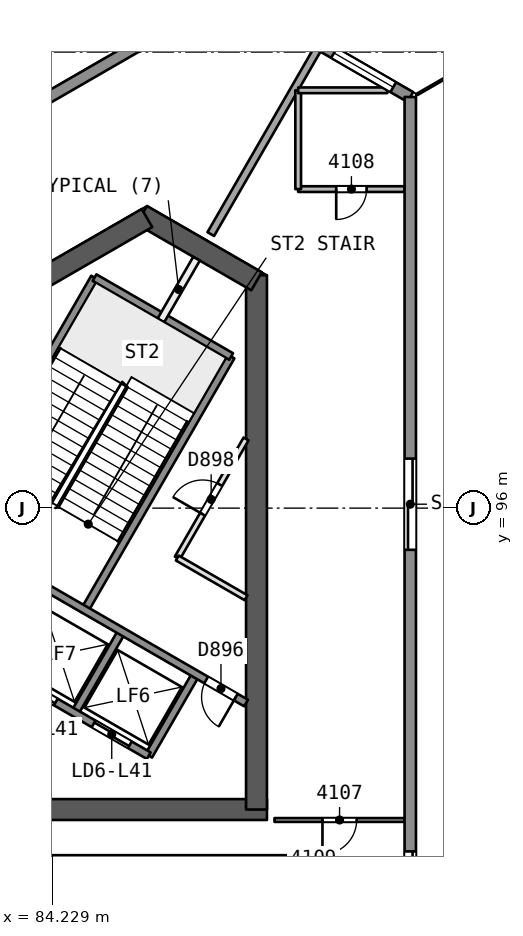
"""IFC4 building model, lengths in metres.
Left out: names, types, materials, properties, quantities, classifications, styles, units other than length and angle.
Written with IfcOpenShell. Run it as: python <this file> out.ifc"""

import sys

from ifc_helpers import new_model, si_unit, direction, frame, frame_2d, origin, place, context, subcontext, project, spatial, rectangle, extrude, element, fill, save


model = new_model("IFC4")
c1 = context("Model", 3, precision=1e-05, world=origin(), true_north=direction((0.0, 1.0)))
c2 = subcontext(c1, "Body", "Model", "MODEL_VIEW")
j1 = project(units=[si_unit("LENGTHUNIT", "METRE"), si_unit("PLANEANGLEUNIT", "RADIAN")], contexts=[c1])
p1 = place(None, origin())
s1 = spatial("IfcSite", under=j1, at=p1, CompositionType="ELEMENT")
p2 = place(p1, origin())
s2 = spatial("IfcBuilding", under=s1, at=p2, CompositionType="ELEMENT")
p3 = place(p2, frame((0.0, 0.0, 171.1)))
s3 = spatial("IfcBuildingStorey", under=s2, at=p3, CompositionType="ELEMENT", Elevation=171.1)
p4 = place(p3, frame((79.659, 88.069, 0.0), z_axis=(0.0, 0.0, 1.0), x_axis=(1.0, 0.0, 0.0)))
e1 = element("IfcWall", 1, at=p4, inside=s3, PredefinedType="SHEAR", context=c2, shape_type="SweptSolid", body=[
    extrude(rectangle(XDim=10.221, YDim=0.55, at=frame_2d((5.111, 0.0))), origin(), (0.0, 0.0, 1.0), 3.7),
])
p5 = place(p4, frame((0.791, 0.0, 0.0)))
e2 = element("IfcOpeningElement", 2, at=p5, cuts=e1, PredefinedType="OPENING", context=c2, shape_type="SweptSolid", body=[
    extrude(rectangle(XDim=1.2, YDim=2.1, at=frame_2d((0.6, 1.05))), frame((0.0, 0.286, 0.0), z_axis=(0.0, -1.0, 0.0), x_axis=(1.0, 0.0, 0.0)), (0.0, 0.0, 1.0), 0.571),
])
p6 = place(p3, frame((89.605, 88.069, 0.0), z_axis=(0.0, 0.0, 1.0), x_axis=(0.0, 1.0, 0.0)))
e3 = element("IfcWall", 3, at=p6, inside=s3, PredefinedType="SHEAR", context=c2, shape_type="SweptSolid", body=[
    extrude(rectangle(XDim=14.058, YDim=0.55, at=frame_2d((7.029, 0.0))), origin(), (0.0, 0.0, 1.0), 3.7),
])
p7 = place(p3, frame((89.605, 101.969, 0.0), z_axis=(0.0, 0.0, 1.0), x_axis=(-0.865997833373, 0.500047750313, 0.0)))
e4 = element("IfcWall", 4, at=p7, inside=s3, PredefinedType="SHEAR", context=c2, shape_type="SweptSolid", body=[
    extrude(rectangle(XDim=3.487, YDim=0.55, at=frame_2d((1.743, 0.0))), origin(), (0.0, 0.0, 1.0), 3.7),
])
p8 = place(p3, frame((86.723, 103.633, 0.0), z_axis=(0.0, 0.0, 1.0), x_axis=(-0.866023530946, -0.500003243837, 0.0)))
e5 = element("IfcWall", 5, at=p8, inside=s3, PredefinedType="SHEAR", context=c2, shape_type="SweptSolid", body=[
    extrude(rectangle(XDim=14.175, YDim=0.55, at=frame_2d((7.087, 0.0))), origin(), (0.0, 0.0, 1.0), 3.7),
])
p9 = place(p3, frame((93.502, 87.794, 0.0), z_axis=(0.0, 0.0, 1.0), x_axis=(-1.0, 0.0, 0.0)))
e6 = element("IfcWall", 6, at=p9, inside=s3, PredefinedType="PARTITIONING", context=c2, shape_type="SweptSolid", body=[
    extrude(rectangle(XDim=3.423, YDim=0.1, at=frame_2d((1.712, 0.0))), origin(), (0.0, 0.0, 1.0), 3.25),
])
p10 = place(p9, frame((1.262, 0.0, 0.0)))
e7 = element("IfcOpeningElement", 7, at=p10, cuts=e6, PredefinedType="OPENING", context=c2, shape_type="SweptSolid", body=[
    extrude(rectangle(XDim=0.9, YDim=2.1, at=frame_2d((0.45, 1.05))), frame((0.0, 0.061, 0.0), z_axis=(0.0, -1.0, 0.0), x_axis=(1.0, 0.0, 0.0)), (0.0, 0.0, 1.0), 0.121),
])
p11 = place(p3, frame((82.1, 86.768, 0.0), z_axis=(0.0, 0.0, 1.0), x_axis=(1.0, 0.0, 0.0)))
e8 = element("IfcWall", 8, at=p11, inside=s3, PredefinedType="PARTITIONING", context=c2, shape_type="SweptSolid", body=[
    extrude(rectangle(XDim=9.0, YDim=0.2, at=frame_2d((4.5, 0.0))), origin(), (0.0, 0.0, 1.0), 3.25),
])
p12 = place(p3, frame((93.502, 104.394, 0.0), z_axis=(0.0, 0.0, 1.0), x_axis=(-1.0, 0.0, 0.0)))
e9 = element("IfcWall", 9, at=p12, inside=s3, PredefinedType="PARTITIONING", context=c2, shape_type="SweptSolid", body=[
    extrude(rectangle(XDim=2.801, YDim=0.15, at=frame_2d((1.4, 0.0))), origin(), (0.0, 0.0, 1.0), 3.25),
])
p13 = place(p12, frame((1.0, 0.0, 0.0)))
e10 = element("IfcOpeningElement", 10, at=p13, cuts=e9, PredefinedType="OPENING", context=c2, shape_type="SweptSolid", body=[
    extrude(rectangle(XDim=0.8, YDim=2.1, at=frame_2d((0.4, 1.05))), frame((0.0, 0.085, 0.0), z_axis=(0.0, -1.0, 0.0), x_axis=(1.0, 0.0, 0.0)), (0.0, 0.0, 1.0), 0.171),
])
p14 = place(p3, frame((90.702, 104.394, 0.0), z_axis=(0.0, 0.0, 1.0), x_axis=(0.0, 1.0, 0.0)))
e11 = element("IfcWall", 11, at=p14, inside=s3, PredefinedType="PARTITIONING", context=c2, shape_type="SweptSolid", body=[
    extrude(rectangle(XDim=2.6, YDim=0.15, at=frame_2d((1.3, 0.0))), origin(), (0.0, 0.0, 1.0), 3.25),
])
p15 = place(p3, frame((90.702, 106.994, 0.0), z_axis=(0.0, 0.0, 1.0), x_axis=(1.0, 0.0, 0.0)))
e12 = element("IfcWall", 12, at=p15, inside=s3, PredefinedType="PARTITIONING", context=c2, shape_type="SweptSolid", body=[
    extrude(rectangle(XDim=2.346, YDim=0.15, at=frame_2d((1.173, 0.0))), origin(), (0.0, 0.0, 1.0), 3.25),
])
p16 = place(p3, frame((91.202, 108.06, 0.0), z_axis=(0.0, 0.0, 1.0), x_axis=(-0.500021875362, -0.86601277367, 0.0)))
e13 = element("IfcWall", 13, at=p16, inside=s3, PredefinedType="PARTITIONING", context=c2, shape_type="SweptSolid", body=[
    extrude(rectangle(XDim=5.599, YDim=0.2, at=frame_2d((2.8, 0.0))), origin(), (0.0, 0.0, 1.0), 3.25),
])
p17 = place(p3, frame((88.899, 109.561, 0.0), z_axis=(0.0, 0.0, 1.0), x_axis=(0.866038895281, -0.499976631314, 0.0)))
e14 = element("IfcWall", 14, at=p17, inside=s3, PredefinedType="SOLIDWALL", context=c2, shape_type="SweptSolid", body=[
    extrude(rectangle(XDim=5.488, YDim=0.3, at=frame_2d((2.744, 0.0))), origin(), (0.0, 0.0, 1.0), 3.25),
])
p18 = place(p17, frame((3.17, 0.0, 0.9)))
e15 = element("IfcOpeningElement", 15, at=p18, cuts=e14, PredefinedType="OPENING", context=c2, shape_type="SweptSolid", body=[
    extrude(rectangle(XDim=1.8, YDim=1.5, at=frame_2d((0.9, 0.75))), frame((0.0, 0.161, 0.0), z_axis=(0.0, -1.0, 0.0), x_axis=(1.0, 0.0, 0.0)), (0.0, 0.0, 1.0), 0.321),
])
p19 = place(p17, frame((0.429, 0.0, 0.9)))
e16 = element("IfcOpeningElement", 16, at=p19, cuts=e14, PredefinedType="OPENING", context=c2, shape_type="SweptSolid", body=[
    extrude(rectangle(XDim=1.8, YDim=1.5, at=frame_2d((0.9, 0.75))), frame((0.0, 0.161, 0.0), z_axis=(0.0, -1.0, 0.0), x_axis=(1.0, 0.0, 0.0)), (0.0, 0.0, 1.0), 0.321),
])
p20 = place(p3, frame((93.651, 106.818, 0.0), z_axis=(0.0, 0.0, 1.0), x_axis=(0.0, -1.0, 0.0)))
e17 = element("IfcWall", 17, at=p20, inside=s3, PredefinedType="SOLIDWALL", context=c2, shape_type="SweptSolid", body=[
    extrude(rectangle(XDim=53.635, YDim=0.3, at=frame_2d((26.818, 0.0))), origin(), (0.0, 0.0, 1.0), 3.25),
])
p21 = place(p20, frame((30.294, 0.0, 0.0)))
e18 = element("IfcOpeningElement", 18, at=p21, cuts=e17, PredefinedType="OPENING", context=c2, shape_type="SweptSolid", body=[
    extrude(rectangle(XDim=2.4, YDim=2.4, at=frame_2d((1.2, 1.2))), frame((0.0, 0.161, 0.0), z_axis=(0.0, -1.0, 0.0), x_axis=(1.0, 0.0, 0.0)), (0.0, 0.0, 1.0), 0.321),
])
p22 = place(p20, frame((41.683, 0.0, 0.0)))
e19 = element("IfcOpeningElement", 19, at=p22, cuts=e17, PredefinedType="OPENING", context=c2, shape_type="SweptSolid", body=[
    extrude(rectangle(XDim=2.4, YDim=2.4, at=frame_2d((1.2, 1.2))), frame((0.0, 0.161, 0.0), z_axis=(0.0, -1.0, 0.0), x_axis=(1.0, 0.0, 0.0)), (0.0, 0.0, 1.0), 0.321),
])
p23 = place(p20, frame((19.85, 0.0, 0.0)))
e20 = element("IfcOpeningElement", 20, at=p23, cuts=e17, PredefinedType="OPENING", context=c2, shape_type="SweptSolid", body=[
    extrude(rectangle(XDim=2.4, YDim=2.4, at=frame_2d((1.2, 1.2))), frame((0.0, 0.161, 0.0), z_axis=(0.0, -1.0, 0.0), x_axis=(1.0, 0.0, 0.0)), (0.0, 0.0, 1.0), 0.321),
])
p24 = place(p20, frame((9.514, 0.0, 0.0)))
e21 = element("IfcOpeningElement", 21, at=p24, cuts=e17, PredefinedType="OPENING", context=c2, shape_type="SweptSolid", body=[
    extrude(rectangle(XDim=2.4, YDim=2.4, at=frame_2d((1.2, 1.2))), frame((0.0, 0.161, 0.0), z_axis=(0.0, -1.0, 0.0), x_axis=(1.0, 0.0, 0.0)), (0.0, 0.0, 1.0), 0.321),
])
p25 = place(p20, frame((24.826, 0.0, 0.9)))
e22 = element("IfcOpeningElement", 22, at=p25, cuts=e17, PredefinedType="OPENING", context=c2, shape_type="SweptSolid", body=[
    extrude(rectangle(XDim=1.8, YDim=1.5, at=frame_2d((0.9, 0.75))), frame((0.0, 0.161, 0.0), z_axis=(0.0, -1.0, 0.0), x_axis=(1.0, 0.0, 0.0)), (0.0, 0.0, 1.0), 0.321),
])
p26 = place(p3, frame((42.45, 82.744, 0.0), z_axis=(0.0, 0.0, 1.0), x_axis=(0.866024128163, 0.500002209434, 0.0)))
e23 = element("IfcWall", 23, at=p26, inside=s3, PredefinedType="SOLIDWALL", context=c2, shape_type="SweptSolid", body=[
    extrude(rectangle(XDim=53.635, YDim=0.3, at=frame_2d((26.817, 0.0))), origin(), (0.0, 0.0, 1.0), 3.25),
])
p27 = place(p26, frame((20.473, 0.0, 0.0)))
e24 = element("IfcOpeningElement", 24, at=p27, cuts=e23, PredefinedType="OPENING", context=c2, shape_type="SweptSolid", body=[
    extrude(rectangle(XDim=2.4, YDim=2.4, at=frame_2d((1.2, 1.2))), frame((0.0, 0.161, 0.0), z_axis=(0.0, -1.0, 0.0), x_axis=(1.0, 0.0, 0.0)), (0.0, 0.0, 1.0), 0.321),
])
p28 = place(p26, frame((9.514, 0.0, 0.0)))
e25 = element("IfcOpeningElement", 25, at=p28, cuts=e23, PredefinedType="OPENING", context=c2, shape_type="SweptSolid", body=[
    extrude(rectangle(XDim=2.4, YDim=2.4, at=frame_2d((1.2, 1.2))), frame((0.0, 0.161, 0.0), z_axis=(0.0, -1.0, 0.0), x_axis=(1.0, 0.0, 0.0)), (0.0, 0.0, 1.0), 0.321),
])
p29 = place(p26, frame((40.628, 0.0, 0.0)))
e26 = element("IfcOpeningElement", 26, at=p29, cuts=e23, PredefinedType="OPENING", context=c2, shape_type="SweptSolid", body=[
    extrude(rectangle(XDim=2.4, YDim=2.4, at=frame_2d((1.2, 1.2))), frame((0.0, 0.161, 0.0), z_axis=(0.0, -1.0, 0.0), x_axis=(1.0, 0.0, 0.0)), (0.0, 0.0, 1.0), 0.321),
])
p30 = place(p26, frame((27.632, 0.0, 0.9)))
e27 = element("IfcOpeningElement", 27, at=p30, cuts=e23, PredefinedType="OPENING", context=c2, shape_type="SweptSolid", body=[
    extrude(rectangle(XDim=1.8, YDim=1.5, at=frame_2d((0.9, 0.75))), frame((0.0, 0.161, 0.0), z_axis=(0.0, -1.0, 0.0), x_axis=(1.0, 0.0, 0.0)), (0.0, 0.0, 1.0), 0.321),
])
p31 = place(p26, frame((24.826, 0.0, 0.9)))
e28 = element("IfcOpeningElement", 28, at=p31, cuts=e23, PredefinedType="OPENING", context=c2, shape_type="SweptSolid", body=[
    extrude(rectangle(XDim=1.8, YDim=1.5, at=frame_2d((0.9, 0.75))), frame((0.0, 0.161, 0.0), z_axis=(0.0, -1.0, 0.0), x_axis=(1.0, 0.0, 0.0)), (0.0, 0.0, 1.0), 0.321),
])
p32 = place(p3, frame((86.77, 89.486, 0.0), z_axis=(0.0, 0.0, 1.0), x_axis=(0.499961042966, 0.86604789447, 0.0)))
e29 = element("IfcWall", 29, at=p32, inside=s3, PredefinedType="SOLIDWALL", context=c2, shape_type="SweptSolid", body=[
    extrude(rectangle(XDim=2.48, YDim=0.2, at=frame_2d((1.24, 0.0))), origin(), (0.0, 0.0, 1.0), 3.25),
])
p33 = place(p3, frame((87.521, 94.687, 0.0), z_axis=(0.0, 0.0, 1.0), x_axis=(0.500043727655, 0.866000156139, 0.0)))
e30 = element("IfcWall", 30, at=p33, inside=s3, PredefinedType="PARTITIONING", context=c2, shape_type="SweptSolid", body=[
    extrude(rectangle(XDim=3.618, YDim=0.15, at=frame_2d((1.809, 0.0))), origin(), (0.0, 0.0, 1.0), 3.25),
])
p34 = place(p33, frame((1.332, 0.0, 0.0)))
e31 = element("IfcOpeningElement", 31, at=p34, cuts=e30, PredefinedType="OPENING", context=c2, shape_type="SweptSolid", body=[
    extrude(rectangle(XDim=0.9, YDim=2.1, at=frame_2d((0.45, 1.05))), frame((0.0, 0.085, 0.0), z_axis=(0.0, -1.0, 0.0), x_axis=(1.0, 0.0, 0.0)), (0.0, 0.0, 1.0), 0.171),
])
p35 = place(p3, frame((84.821, 90.611, 0.0), z_axis=(0.0, 0.0, 1.0), x_axis=(0.499961042966, 0.86604789447, 0.0)))
e32 = element("IfcWall", 32, at=p35, inside=s3, PredefinedType="SOLIDWALL", context=c2, shape_type="SweptSolid", body=[
    extrude(rectangle(XDim=2.48, YDim=0.2, at=frame_2d((1.24, 0.0))), origin(), (0.0, 0.0, 1.0), 3.25),
])
p36 = place(p3, frame((85.087, 93.321, 0.0), z_axis=(0.0, 0.0, 1.0), x_axis=(0.500019787375, 0.866013979237, 0.0)))
e33 = element("IfcWall", 33, at=p36, inside=s3, PredefinedType="SOLIDWALL", context=c2, shape_type="SweptSolid", body=[
    extrude(rectangle(XDim=7.7, YDim=0.2, at=frame_2d((3.85, 0.0))), origin(), (0.0, 0.0, 1.0), 3.25),
])
p37 = place(p3, frame((87.09, 100.94, 0.0), z_axis=(0.0, 0.0, 1.0), x_axis=(0.499951854219, 0.86605319898, 0.0)))
e34 = element("IfcWall", 34, at=p37, inside=s3, PredefinedType="PARTITIONING", context=c2, shape_type="SweptSolid", body=[
    extrude(rectangle(XDim=1.873, YDim=0.2, at=frame_2d((0.937, 0.0))), origin(), (0.0, 0.0, 1.0), 3.25),
])
p38 = place(p3, frame((81.493, 95.396, 0.0), z_axis=(0.0, 0.0, 1.0), x_axis=(0.500006057782, 0.866021906294, 0.0)))
e35 = element("IfcWall", 35, at=p38, inside=s3, PredefinedType="SOLIDWALL", context=c2, shape_type="SweptSolid", body=[
    extrude(rectangle(XDim=7.7, YDim=0.2, at=frame_2d((3.85, 0.0))), origin(), (0.0, 0.0, 1.0), 3.25),
])
p39 = place(p38, frame((0.55, 0.0, 0.0)))
e36 = element("IfcOpeningElement", 36, at=p39, cuts=e35, PredefinedType="OPENING", context=c2, shape_type="SweptSolid", body=[
    extrude(rectangle(XDim=1.1, YDim=2.1, at=frame_2d((0.55, 1.05))), frame((0.0, 0.11, 0.0), z_axis=(0.0, -1.0, 0.0), x_axis=(1.0, 0.0, 0.0)), (0.0, 0.0, 1.0), 0.221),
])
p40 = place(p3, frame((86.77, 89.486, 0.0), z_axis=(0.0, 0.0, 1.0), x_axis=(-0.86601811187, 0.500012629753, 0.0)))
e37 = element("IfcWall", 37, at=p40, inside=s3, PredefinedType="SOLIDWALL", context=c2, shape_type="SweptSolid", body=[
    extrude(rectangle(XDim=10.9, YDim=0.2, at=frame_2d((5.45, 0.0))), origin(), (0.0, 0.0, 1.0), 3.25),
])
p41 = place(p40, frame((0.575, 0.0, 0.0)))
e38 = element("IfcOpeningElement", 38, at=p41, cuts=e37, PredefinedType="OPENING", context=c2, shape_type="SweptSolid", body=[
    extrude(rectangle(XDim=1.1, YDim=2.1, at=frame_2d((0.55, 1.05))), frame((0.0, 0.11, 0.0), z_axis=(0.0, -1.0, 0.0), x_axis=(1.0, 0.0, 0.0)), (0.0, 0.0, 1.0), 0.221),
])
p42 = place(p40, frame((2.825, 0.0, 0.0)))
e39 = element("IfcOpeningElement", 39, at=p42, cuts=e37, PredefinedType="OPENING", context=c2, shape_type="SweptSolid", body=[
    extrude(rectangle(XDim=1.1, YDim=2.1, at=frame_2d((0.55, 1.05))), frame((0.0, 0.11, 0.0), z_axis=(0.0, -1.0, 0.0), x_axis=(1.0, 0.0, 0.0)), (0.0, 0.0, 1.0), 0.221),
])
p43 = place(p40, frame((5.075, 0.0, 0.0)))
e40 = element("IfcOpeningElement", 40, at=p43, cuts=e37, PredefinedType="OPENING", context=c2, shape_type="SweptSolid", body=[
    extrude(rectangle(XDim=1.1, YDim=2.1, at=frame_2d((0.55, 1.05))), frame((0.0, 0.11, 0.0), z_axis=(0.0, -1.0, 0.0), x_axis=(1.0, 0.0, 0.0)), (0.0, 0.0, 1.0), 0.221),
])
p44 = place(p40, frame((7.325, 0.0, 0.0)))
e41 = element("IfcOpeningElement", 41, at=p44, cuts=e37, PredefinedType="OPENING", context=c2, shape_type="SweptSolid", body=[
    extrude(rectangle(XDim=1.1, YDim=2.1, at=frame_2d((0.55, 1.05))), frame((0.0, 0.11, 0.0), z_axis=(0.0, -1.0, 0.0), x_axis=(1.0, 0.0, 0.0)), (0.0, 0.0, 1.0), 0.221),
])
p45 = place(p3, frame((89.33, 90.872, 0.0), z_axis=(0.0, 0.0, 1.0), x_axis=(-0.866027589512, 0.49999621419, 0.0)))
e42 = element("IfcWall", 42, at=p45, inside=s3, PredefinedType="SOLIDWALL", context=c2, shape_type="SweptSolid", body=[
    extrude(rectangle(XDim=10.524, YDim=0.2, at=frame_2d((5.262, 0.0))), origin(), (0.0, 0.0, 1.0), 3.25),
])
p46 = place(p45, frame((0.312, 0.0, 0.0)))
e43 = element("IfcOpeningElement", 43, at=p46, cuts=e42, PredefinedType="OPENING", context=c2, shape_type="SweptSolid", body=[
    extrude(rectangle(XDim=0.9, YDim=2.1, at=frame_2d((0.45, 1.05))), frame((0.0, 0.11, 0.0), z_axis=(0.0, -1.0, 0.0), x_axis=(1.0, 0.0, 0.0)), (0.0, 0.0, 1.0), 0.221),
])
p47 = place(p3, frame((89.33, 93.643, 0.0), z_axis=(0.0, 0.0, 1.0), x_axis=(-0.866033778982, 0.499985493453, 0.0)))
e44 = element("IfcWall", 44, at=p47, inside=s3, PredefinedType="PARTITIONING", context=c2, shape_type="SweptSolid", body=[
    extrude(rectangle(XDim=2.089, YDim=0.15, at=frame_2d((1.044, 0.0))), origin(), (0.0, 0.0, 1.0), 3.25),
])
p48 = place(p3, frame((88.937, 99.99, 0.0), z_axis=(0.0, 0.0, 1.0), x_axis=(-0.866004344652, 0.500036473714, 0.0)))
e45 = element("IfcWall", 45, at=p48, inside=s3, PredefinedType="SOLIDWALL", context=c2, shape_type="SweptSolid", body=[
    extrude(rectangle(XDim=4.15, YDim=0.2, at=frame_2d((2.075, 0.0))), origin(), (0.0, 0.0, 1.0), 3.25),
])
p49 = place(p10, origin())
e46 = element("IfcDoor", 46, at=p49, inside=s3, OperationType="SINGLE_SWING_RIGHT", PredefinedType="NOTDEFINED", context=c2, shape_type="SweptSolid", body=[
    extrude(rectangle(XDim=0.9, YDim=2.1, at=frame_2d((0.45, 1.05))), frame((0.0, 0.025, 0.0), z_axis=(0.0, -1.0, 0.0), x_axis=(1.0, 0.0, 0.0)), (0.0, 0.0, 1.0), 0.05),
])
fill(e7, e46)
p50 = place(p13, origin())
e47 = element("IfcDoor", 47, at=p50, inside=s3, OperationType="SINGLE_SWING_RIGHT", PredefinedType="NOTDEFINED", context=c2, shape_type="SweptSolid", body=[
    extrude(rectangle(XDim=0.8, YDim=2.1, at=frame_2d((0.4, 1.05))), frame((0.0, 0.025, 0.0), z_axis=(0.0, -1.0, 0.0), x_axis=(1.0, 0.0, 0.0)), (0.0, 0.0, 1.0), 0.05),
])
fill(e10, e47)
p51 = place(p18, origin())
e48 = element("IfcWindow", 48, at=p51, inside=s3, PartitioningType="SINGLE_PANEL", PredefinedType="WINDOW", context=c2, shape_type="SweptSolid", body=[
    extrude(rectangle(XDim=1.8, YDim=1.5, at=frame_2d((0.9, 0.75))), frame((0.0, 0.03, 0.0), z_axis=(0.0, -1.0, 0.0), x_axis=(1.0, 0.0, 0.0)), (0.0, 0.0, 1.0), 0.06),
])
fill(e15, e48)
p52 = place(p23, origin())
e49 = element("IfcDoor", 49, at=p52, inside=s3, OperationType="SLIDING_TO_LEFT", PredefinedType="NOTDEFINED", context=c2, shape_type="SweptSolid", body=[
    extrude(rectangle(XDim=2.4, YDim=2.4, at=frame_2d((1.2, 1.2))), frame((0.0, 0.025, 0.0), z_axis=(0.0, -1.0, 0.0), x_axis=(1.0, 0.0, 0.0)), (0.0, 0.0, 1.0), 0.05),
])
fill(e20, e49)
p53 = place(p24, origin())
e50 = element("IfcDoor", 50, at=p53, inside=s3, OperationType="SLIDING_TO_RIGHT", PredefinedType="NOTDEFINED", context=c2, shape_type="SweptSolid", body=[
    extrude(rectangle(XDim=2.4, YDim=2.4, at=frame_2d((1.2, 1.2))), frame((0.0, 0.025, 0.0), z_axis=(0.0, -1.0, 0.0), x_axis=(1.0, 0.0, 0.0)), (0.0, 0.0, 1.0), 0.05),
])
fill(e21, e50)
p54 = place(p41, origin())
e51 = element("IfcDoor", 51, at=p54, inside=s3, OperationType="SLIDING_TO_RIGHT", PredefinedType="NOTDEFINED", context=c2, shape_type="SweptSolid", body=[
    extrude(rectangle(XDim=1.1, YDim=2.1, at=frame_2d((0.55, 1.05))), frame((0.0, 0.025, 0.0), z_axis=(0.0, -1.0, 0.0), x_axis=(1.0, 0.0, 0.0)), (0.0, 0.0, 1.0), 0.05),
])
fill(e38, e51)
p55 = place(p42, origin())
e52 = element("IfcDoor", 52, at=p55, inside=s3, OperationType="SLIDING_TO_LEFT", PredefinedType="NOTDEFINED", context=c2, shape_type="SweptSolid", body=[
    extrude(rectangle(XDim=1.1, YDim=2.1, at=frame_2d((0.55, 1.05))), frame((0.0, 0.025, 0.0), z_axis=(0.0, -1.0, 0.0), x_axis=(1.0, 0.0, 0.0)), (0.0, 0.0, 1.0), 0.05),
])
fill(e39, e52)
p56 = place(p46, origin())
e53 = element("IfcDoor", 53, at=p56, inside=s3, OperationType="SINGLE_SWING_LEFT", PredefinedType="NOTDEFINED", context=c2, shape_type="SweptSolid", body=[
    extrude(rectangle(XDim=0.9, YDim=2.1, at=frame_2d((0.45, 1.05))), frame((0.0, 0.025, 0.0), z_axis=(0.0, -1.0, 0.0), x_axis=(1.0, 0.0, 0.0)), (0.0, 0.0, 1.0), 0.05),
])
fill(e43, e53)
p57 = place(p34, origin())
e54 = element("IfcDoor", 54, at=p57, inside=s3, OperationType="SINGLE_SWING_LEFT", PredefinedType="NOTDEFINED", context=c2, shape_type="SweptSolid", body=[
    extrude(rectangle(XDim=0.9, YDim=2.1, at=frame_2d((0.45, 1.05))), frame((0.0, 0.025, 0.0), z_axis=(0.0, -1.0, 0.0), x_axis=(1.0, 0.0, 0.0)), (0.0, 0.0, 1.0), 0.05),
])
fill(e31, e54)
save(model, sys.argv[1])
